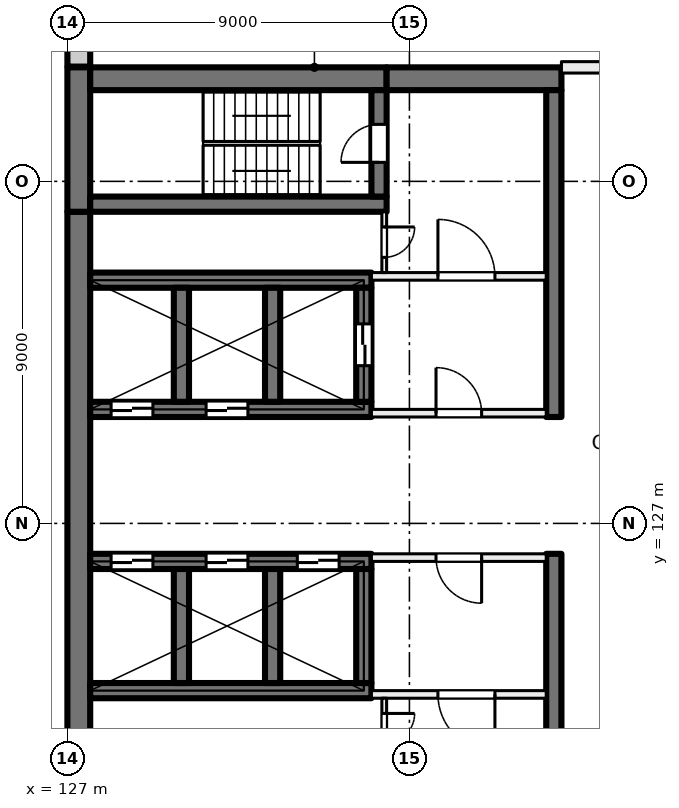
"""IFC4 building model, lengths in metres.
Left out: names, types, materials, properties, quantities, classifications, styles, units other than length and angle.
Written with IfcOpenShell. Run it as: python <this file> out.ifc"""

import sys

from ifc_helpers import new_model, si_unit, direction, frame, frame_2d, origin, place, context, subcontext, project, spatial, rectangle, extrude, element, fill, save


model = new_model("IFC4")
c1 = context("Model", 3, precision=1e-05, world=origin(), true_north=direction((0.0, 1.0)))
c2 = subcontext(c1, "Body", "Model", "MODEL_VIEW")
j1 = project(units=[si_unit("LENGTHUNIT", "METRE"), si_unit("PLANEANGLEUNIT", "RADIAN")], contexts=[c1])
p1 = place(None, origin())
s1 = spatial("IfcSite", under=j1, at=p1, CompositionType="ELEMENT")
p2 = place(p1, origin())
s2 = spatial("IfcBuilding", under=s1, at=p2, CompositionType="ELEMENT")
p3 = place(p2, frame((0.0, 0.0, 101.0)))
s3 = spatial("IfcBuildingStorey", under=s2, at=p3, CompositionType="ELEMENT", Elevation=101.0)
p4 = place(p3, frame((127.3, 120.8, 0.0), z_axis=(0.0, 0.0, 1.0), x_axis=(0.0, 1.0, 0.0)))
e1 = element("IfcWall", 1, at=p4, inside=s3, PredefinedType="SHEAR", context=c2, shape_type="SweptSolid", body=[
    extrude(rectangle(XDim=14.4, YDim=0.6, at=frame_2d((7.2, 0.0))), origin(), (0.0, 0.0, 1.0), 4.0),
])
p5 = place(p3, frame((127.3, 135.2, 0.0), z_axis=(0.0, 0.0, 1.0), x_axis=(0.0, 1.0, 0.0)))
e2 = element("IfcWall", 2, at=p5, inside=s3, PredefinedType="SHEAR", context=c2, shape_type="SweptSolid", body=[
    extrude(rectangle(XDim=3.8, YDim=0.6, at=frame_2d((1.9, 0.0))), origin(), (0.0, 0.0, 1.0), 4.0),
])
p6 = place(p3, frame((127.6, 138.7, 0.0), z_axis=(0.0, 0.0, 1.0), x_axis=(1.0, 0.0, 0.0)))
e3 = element("IfcWall", 3, at=p6, inside=s3, PredefinedType="SHEAR", context=c2, shape_type="SweptSolid", body=[
    extrude(rectangle(XDim=7.8, YDim=0.6, at=frame_2d((3.9, 0.0))), origin(), (0.0, 0.0, 1.0), 4.0),
])
p7 = place(p3, frame((135.4, 138.7, 0.0), z_axis=(0.0, 0.0, 1.0), x_axis=(1.0, 0.0, 0.0)))
e4 = element("IfcWall", 4, at=p7, inside=s3, PredefinedType="SHEAR", context=c2, shape_type="SweptSolid", body=[
    extrude(rectangle(XDim=4.6, YDim=0.6, at=frame_2d((2.3, 0.0))), origin(), (0.0, 0.0, 1.0), 4.0),
])
p8 = place(p3, frame((127.6, 135.4, 0.0), z_axis=(0.0, 0.0, 1.0), x_axis=(1.0, 0.0, 0.0)))
e5 = element("IfcWall", 5, at=p8, inside=s3, PredefinedType="SHEAR", context=c2, shape_type="SweptSolid", body=[
    extrude(rectangle(XDim=7.8, YDim=0.4, at=frame_2d((3.9, 0.0))), origin(), (0.0, 0.0, 1.0), 4.0),
])
p9 = place(p3, frame((135.2, 135.6, 0.0), z_axis=(0.0, 0.0, 1.0), x_axis=(0.0, 1.0, 0.0)))
e6 = element("IfcWall", 6, at=p9, inside=s3, PredefinedType="SHEAR", context=c2, shape_type="SweptSolid", body=[
    extrude(rectangle(XDim=2.8, YDim=0.4, at=frame_2d((1.4, 0.0))), origin(), (0.0, 0.0, 1.0), 4.0),
])
p10 = place(p9, frame((0.9, 0.0, 0.0)))
e7 = element("IfcOpeningElement", 7, at=p10, cuts=e6, PredefinedType="OPENING", context=c2, shape_type="SweptSolid", body=[
    extrude(rectangle(XDim=1.0, YDim=2.1, at=frame_2d((0.5, 1.05))), frame((0.0, 0.21, 0.0), z_axis=(0.0, -1.0, 0.0), x_axis=(1.0, 0.0, 0.0)), (0.0, 0.0, 1.0), 0.42),
])
p11 = place(p3, frame((127.6, 126.0, 0.0), z_axis=(0.0, 0.0, 1.0), x_axis=(1.0, 0.0, 0.0)))
e8 = element("IfcWall", 8, at=p11, inside=s3, PredefinedType="SHEAR", context=c2, shape_type="SweptSolid", body=[
    extrude(rectangle(XDim=7.4, YDim=0.4, at=frame_2d((3.7, 0.0))), origin(), (0.0, 0.0, 1.0), 4.0),
])
p12 = place(p11, frame((0.55, 0.0, 0.0)))
e9 = element("IfcOpeningElement", 9, at=p12, cuts=e8, PredefinedType="OPENING", context=c2, shape_type="SweptSolid", body=[
    extrude(rectangle(XDim=1.1, YDim=2.1, at=frame_2d((0.55, 1.05))), frame((0.0, 0.21, 0.0), z_axis=(0.0, -1.0, 0.0), x_axis=(1.0, 0.0, 0.0)), (0.0, 0.0, 1.0), 0.42),
])
p13 = place(p11, frame((3.05, 0.0, 0.0)))
e10 = element("IfcOpeningElement", 10, at=p13, cuts=e8, PredefinedType="OPENING", context=c2, shape_type="SweptSolid", body=[
    extrude(rectangle(XDim=1.1, YDim=2.1, at=frame_2d((0.55, 1.05))), frame((0.0, 0.21, 0.0), z_axis=(0.0, -1.0, 0.0), x_axis=(1.0, 0.0, 0.0)), (0.0, 0.0, 1.0), 0.42),
])
p14 = place(p11, frame((5.45, 0.0, 0.0)))
e11 = element("IfcOpeningElement", 11, at=p14, cuts=e8, PredefinedType="OPENING", context=c2, shape_type="SweptSolid", body=[
    extrude(rectangle(XDim=1.1, YDim=2.1, at=frame_2d((0.55, 1.05))), frame((0.0, 0.21, 0.0), z_axis=(0.0, -1.0, 0.0), x_axis=(1.0, 0.0, 0.0)), (0.0, 0.0, 1.0), 0.42),
])
p15 = place(p3, frame((127.6, 122.6, 0.0), z_axis=(0.0, 0.0, 1.0), x_axis=(1.0, 0.0, 0.0)))
e12 = element("IfcWall", 12, at=p15, inside=s3, PredefinedType="SHEAR", context=c2, shape_type="SweptSolid", body=[
    extrude(rectangle(XDim=7.4, YDim=0.4, at=frame_2d((3.7, 0.0))), origin(), (0.0, 0.0, 1.0), 4.0),
])
for number, where, z_axis, x_axis in (
    (13, (130.0, 122.8, 0.0), (0.0, 0.0, 1.0), (0.0, 1.0, 0.0)),
    (14, (132.4, 122.8, 0.0), (0.0, 0.0, 1.0), (0.0, 1.0, 0.0)),
    (15, (134.8, 122.8, 0.0), (0.0, 0.0, 1.0), (0.0, 1.0, 0.0)),
):
    element("IfcWall", number, at=place(p3, frame(where, z_axis=z_axis, x_axis=x_axis)), inside=s3, PredefinedType="SHEAR", context=c2, shape_type="SweptSolid", body=[
        extrude(rectangle(XDim=3.0, YDim=0.4, at=frame_2d((1.5, 0.0))), origin(), (0.0, 0.0, 1.0), 4.0),
    ])
p16 = place(p3, frame((127.6, 130.0, 0.0), z_axis=(0.0, 0.0, 1.0), x_axis=(1.0, 0.0, 0.0)))
e16 = element("IfcWall", 16, at=p16, inside=s3, PredefinedType="SHEAR", context=c2, shape_type="SweptSolid", body=[
    extrude(rectangle(XDim=7.4, YDim=0.4, at=frame_2d((3.7, 0.0))), origin(), (0.0, 0.0, 1.0), 4.0),
])
p17 = place(p16, frame((0.55, 0.0, 0.0)))
e17 = element("IfcOpeningElement", 17, at=p17, cuts=e16, PredefinedType="OPENING", context=c2, shape_type="SweptSolid", body=[
    extrude(rectangle(XDim=1.1, YDim=2.1, at=frame_2d((0.55, 1.05))), frame((0.0, 0.21, 0.0), z_axis=(0.0, -1.0, 0.0), x_axis=(1.0, 0.0, 0.0)), (0.0, 0.0, 1.0), 0.42),
])
p18 = place(p16, frame((3.05, 0.0, 0.0)))
e18 = element("IfcOpeningElement", 18, at=p18, cuts=e16, PredefinedType="OPENING", context=c2, shape_type="SweptSolid", body=[
    extrude(rectangle(XDim=1.1, YDim=2.1, at=frame_2d((0.55, 1.05))), frame((0.0, 0.21, 0.0), z_axis=(0.0, -1.0, 0.0), x_axis=(1.0, 0.0, 0.0)), (0.0, 0.0, 1.0), 0.42),
])
p19 = place(p3, frame((127.6, 133.4, 0.0), z_axis=(0.0, 0.0, 1.0), x_axis=(1.0, 0.0, 0.0)))
e19 = element("IfcWall", 19, at=p19, inside=s3, PredefinedType="SHEAR", context=c2, shape_type="SweptSolid", body=[
    extrude(rectangle(XDim=7.4, YDim=0.4, at=frame_2d((3.7, 0.0))), origin(), (0.0, 0.0, 1.0), 4.0),
])
for number, where, z_axis, x_axis in (
    (20, (130.0, 130.2, 0.0), (0.0, 0.0, 1.0), (0.0, 1.0, 0.0)),
    (21, (132.4, 130.2, 0.0), (0.0, 0.0, 1.0), (0.0, 1.0, 0.0)),
):
    element("IfcWall", number, at=place(p3, frame(where, z_axis=z_axis, x_axis=x_axis)), inside=s3, PredefinedType="SHEAR", context=c2, shape_type="SweptSolid", body=[
        extrude(rectangle(XDim=3.0, YDim=0.4, at=frame_2d((1.5, 0.0))), origin(), (0.0, 0.0, 1.0), 4.0),
    ])
p20 = place(p3, frame((134.8, 130.2, 0.0), z_axis=(0.0, 0.0, 1.0), x_axis=(0.0, 1.0, 0.0)))
e22 = element("IfcWall", 22, at=p20, inside=s3, PredefinedType="SHEAR", context=c2, shape_type="SweptSolid", body=[
    extrude(rectangle(XDim=3.0, YDim=0.4, at=frame_2d((1.5, 0.0))), origin(), (0.0, 0.0, 1.0), 4.0),
])
p21 = place(p20, frame((0.95, 0.0, 0.0)))
e23 = element("IfcOpeningElement", 23, at=p21, cuts=e22, PredefinedType="OPENING", context=c2, shape_type="SweptSolid", body=[
    extrude(rectangle(XDim=1.1, YDim=2.1, at=frame_2d((0.55, 1.05))), frame((0.0, 0.21, 0.0), z_axis=(0.0, -1.0, 0.0), x_axis=(1.0, 0.0, 0.0)), (0.0, 0.0, 1.0), 0.42),
])
for number, where, z_axis, x_axis in (
    (24, (139.8, 117.6, 0.0), (0.0, 0.0, 1.0), (0.0, 1.0, 0.0)),
    (25, (139.8, 129.8, 0.0), (0.0, 0.0, 1.0), (0.0, 1.0, 0.0)),
):
    element("IfcWall", number, at=place(p3, frame(where, z_axis=z_axis, x_axis=x_axis)), inside=s3, PredefinedType="SHEAR", context=c2, shape_type="SweptSolid", body=[
        extrude(rectangle(XDim=8.6, YDim=0.4, at=frame_2d((4.3, 0.0))), origin(), (0.0, 0.0, 1.0), 4.0),
    ])
p22 = place(p3, frame((127.3, 139.02, 0.0), z_axis=(0.0, 0.0, 1.0), x_axis=(0.0, 1.0, 0.0)))
e26 = element("IfcWall", 26, at=p22, inside=s3, PredefinedType="SOLIDWALL", context=c2, shape_type="SweptSolid", body=[
    extrude(rectangle(XDim=2.98, YDim=0.6, at=frame_2d((1.49, 0.0))), origin(), (0.0, 0.0, 1.0), 3.625),
])
p23 = place(p3, frame((135.0, 129.9, 0.0), z_axis=(0.0, 0.0, 1.0), x_axis=(1.0, 0.0, 0.0)))
e27 = element("IfcWall", 27, at=p23, inside=s3, PredefinedType="PARTITIONING", context=c2, shape_type="SweptSolid", body=[
    extrude(rectangle(XDim=4.6, YDim=0.2, at=frame_2d((2.3, 0.0))), origin(), (0.0, 0.0, 1.0), 3.625),
])
p24 = place(p23, frame((1.7, 0.0, 0.0)))
e28 = element("IfcOpeningElement", 28, at=p24, cuts=e27, PredefinedType="OPENING", context=c2, shape_type="SweptSolid", body=[
    extrude(rectangle(XDim=1.2, YDim=2.1, at=frame_2d((0.6, 1.05))), frame((0.0, 0.11, 0.0), z_axis=(0.0, -1.0, 0.0), x_axis=(1.0, 0.0, 0.0)), (0.0, 0.0, 1.0), 0.22),
])
p25 = place(p3, frame((135.0, 133.5, 0.0), z_axis=(0.0, 0.0, 1.0), x_axis=(1.0, 0.0, 0.0)))
e29 = element("IfcWall", 29, at=p25, inside=s3, PredefinedType="PARTITIONING", context=c2, shape_type="SweptSolid", body=[
    extrude(rectangle(XDim=4.6, YDim=0.2, at=frame_2d((2.3, 0.0))), origin(), (0.0, 0.0, 1.0), 3.625),
])
p26 = place(p25, frame((1.75, 0.0, 0.0)))
e30 = element("IfcOpeningElement", 30, at=p26, cuts=e29, PredefinedType="OPENING", context=c2, shape_type="SweptSolid", body=[
    extrude(rectangle(XDim=1.5, YDim=2.1, at=frame_2d((0.75, 1.05))), frame((0.0, 0.11, 0.0), z_axis=(0.0, -1.0, 0.0), x_axis=(1.0, 0.0, 0.0)), (0.0, 0.0, 1.0), 0.22),
])
p27 = place(p3, frame((135.337, 135.2, 0.0), z_axis=(0.0, 0.0, 1.0), x_axis=(0.0, -1.0, 0.0)))
e31 = element("IfcWall", 31, at=p27, inside=s3, PredefinedType="PARTITIONING", context=c2, shape_type="SweptSolid", body=[
    extrude(rectangle(XDim=1.6, YDim=0.125, at=frame_2d((0.8, 0.0))), origin(), (0.0, 0.0, 1.0), 3.625),
])
p28 = place(p27, frame((0.4, 0.0, 0.0)))
e32 = element("IfcOpeningElement", 32, at=p28, cuts=e31, PredefinedType="OPENING", context=c2, shape_type="SweptSolid", body=[
    extrude(rectangle(XDim=0.8, YDim=2.1, at=frame_2d((0.4, 1.05))), frame((0.0, 0.073, 0.0), z_axis=(0.0, -1.0, 0.0), x_axis=(1.0, 0.0, 0.0)), (0.0, 0.0, 1.0), 0.145),
])
p29 = place(p3, frame((139.6, 126.1, 0.0), z_axis=(0.0, 0.0, 1.0), x_axis=(-1.0, 0.0, 0.0)))
e33 = element("IfcWall", 33, at=p29, inside=s3, PredefinedType="PARTITIONING", context=c2, shape_type="SweptSolid", body=[
    extrude(rectangle(XDim=4.6, YDim=0.2, at=frame_2d((2.3, 0.0))), origin(), (0.0, 0.0, 1.0), 3.625),
])
p30 = place(p29, frame((1.7, 0.0, 0.0)))
e34 = element("IfcOpeningElement", 34, at=p30, cuts=e33, PredefinedType="OPENING", context=c2, shape_type="SweptSolid", body=[
    extrude(rectangle(XDim=1.2, YDim=2.1, at=frame_2d((0.6, 1.05))), frame((0.0, 0.11, 0.0), z_axis=(0.0, -1.0, 0.0), x_axis=(1.0, 0.0, 0.0)), (0.0, 0.0, 1.0), 0.22),
])
p31 = place(p3, frame((139.6, 122.5, 0.0), z_axis=(0.0, 0.0, 1.0), x_axis=(-1.0, 0.0, 0.0)))
e35 = element("IfcWall", 35, at=p31, inside=s3, PredefinedType="PARTITIONING", context=c2, shape_type="SweptSolid", body=[
    extrude(rectangle(XDim=4.6, YDim=0.2, at=frame_2d((2.3, 0.0))), origin(), (0.0, 0.0, 1.0), 3.625),
])
p32 = place(p31, frame((1.35, 0.0, 0.0)))
e36 = element("IfcOpeningElement", 36, at=p32, cuts=e35, PredefinedType="OPENING", context=c2, shape_type="SweptSolid", body=[
    extrude(rectangle(XDim=1.5, YDim=2.1, at=frame_2d((0.75, 1.05))), frame((0.0, 0.11, 0.0), z_axis=(0.0, -1.0, 0.0), x_axis=(1.0, 0.0, 0.0)), (0.0, 0.0, 1.0), 0.22),
])
p33 = place(p3, frame((135.337, 122.4, 0.0), z_axis=(0.0, 0.0, 1.0), x_axis=(0.0, -1.0, 0.0)))
e37 = element("IfcWall", 37, at=p33, inside=s3, PredefinedType="PARTITIONING", context=c2, shape_type="SweptSolid", body=[
    extrude(rectangle(XDim=1.6, YDim=0.125, at=frame_2d((0.8, 0.0))), origin(), (0.0, 0.0, 1.0), 3.625),
])
p34 = place(p33, frame((0.4, 0.0, 0.0)))
e38 = element("IfcOpeningElement", 38, at=p34, cuts=e37, PredefinedType="OPENING", context=c2, shape_type="SweptSolid", body=[
    extrude(rectangle(XDim=0.8, YDim=2.1, at=frame_2d((0.4, 1.05))), frame((0.0, 0.073, 0.0), z_axis=(0.0, -1.0, 0.0), x_axis=(1.0, 0.0, 0.0)), (0.0, 0.0, 1.0), 0.145),
])
p35 = place(p3, frame((140.0, 139.0, 0.0), z_axis=(0.0, 0.0, 1.0), x_axis=(1.0, 0.0, 0.0)))
e39 = element("IfcWall", 39, at=p35, inside=s3, PredefinedType="PARTITIONING", context=c2, shape_type="SweptSolid", body=[
    extrude(rectangle(XDim=4.35, YDim=0.3, at=frame_2d((2.175, 0.0))), origin(), (0.0, 0.0, 1.0), 3.625),
])
p36 = place(p35, frame((1.283, 0.0, 0.0)))
e40 = element("IfcOpeningElement", 40, at=p36, cuts=e39, PredefinedType="OPENING", context=c2, shape_type="SweptSolid", body=[
    extrude(rectangle(XDim=1.8, YDim=2.1, at=frame_2d((0.9, 1.05))), frame((0.0, 0.16, 0.0), z_axis=(0.0, -1.0, 0.0), x_axis=(1.0, 0.0, 0.0)), (0.0, 0.0, 1.0), 0.32),
])
p37 = place(p17, origin())
e41 = element("IfcDoor", 41, at=p37, inside=s3, OperationType="DOUBLE_DOOR_SLIDING", PredefinedType="DOOR", context=c2, shape_type="SweptSolid", body=[
    extrude(rectangle(XDim=1.1, YDim=2.1, at=frame_2d((0.55, 1.05))), frame((0.0, 0.025, 0.0), z_axis=(0.0, -1.0, 0.0), x_axis=(1.0, 0.0, 0.0)), (0.0, 0.0, 1.0), 0.05),
])
fill(e17, e41)
p38 = place(p18, origin())
e42 = element("IfcDoor", 42, at=p38, inside=s3, OperationType="DOUBLE_DOOR_SLIDING", PredefinedType="DOOR", context=c2, shape_type="SweptSolid", body=[
    extrude(rectangle(XDim=1.1, YDim=2.1, at=frame_2d((0.55, 1.05))), frame((0.0, 0.025, 0.0), z_axis=(0.0, -1.0, 0.0), x_axis=(1.0, 0.0, 0.0)), (0.0, 0.0, 1.0), 0.05),
])
fill(e18, e42)
p39 = place(p12, origin())
e43 = element("IfcDoor", 43, at=p39, inside=s3, OperationType="DOUBLE_DOOR_SLIDING", PredefinedType="DOOR", context=c2, shape_type="SweptSolid", body=[
    extrude(rectangle(XDim=1.1, YDim=2.1, at=frame_2d((0.55, 1.05))), frame((0.0, 0.025, 0.0), z_axis=(0.0, -1.0, 0.0), x_axis=(1.0, 0.0, 0.0)), (0.0, 0.0, 1.0), 0.05),
])
fill(e9, e43)
p40 = place(p13, origin())
e44 = element("IfcDoor", 44, at=p40, inside=s3, OperationType="DOUBLE_DOOR_SLIDING", PredefinedType="DOOR", context=c2, shape_type="SweptSolid", body=[
    extrude(rectangle(XDim=1.1, YDim=2.1, at=frame_2d((0.55, 1.05))), frame((0.0, 0.025, 0.0), z_axis=(0.0, -1.0, 0.0), x_axis=(1.0, 0.0, 0.0)), (0.0, 0.0, 1.0), 0.05),
])
fill(e10, e44)
p41 = place(p14, origin())
e45 = element("IfcDoor", 45, at=p41, inside=s3, OperationType="DOUBLE_DOOR_SLIDING", PredefinedType="DOOR", context=c2, shape_type="SweptSolid", body=[
    extrude(rectangle(XDim=1.1, YDim=2.1, at=frame_2d((0.55, 1.05))), frame((0.0, 0.025, 0.0), z_axis=(0.0, -1.0, 0.0), x_axis=(1.0, 0.0, 0.0)), (0.0, 0.0, 1.0), 0.05),
])
fill(e11, e45)
p42 = place(p24, origin())
e46 = element("IfcDoor", 46, at=p42, inside=s3, OperationType="DOUBLE_DOOR_SINGLE_SWING", PredefinedType="DOOR", context=c2, shape_type="SweptSolid", body=[
    extrude(rectangle(XDim=1.2, YDim=2.1, at=frame_2d((0.6, 1.05))), frame((0.0, 0.025, 0.0), z_axis=(0.0, -1.0, 0.0), x_axis=(1.0, 0.0, 0.0)), (0.0, 0.0, 1.0), 0.05),
])
fill(e28, e46)
p43 = place(p26, origin())
e47 = element("IfcDoor", 47, at=p43, inside=s3, OperationType="DOUBLE_DOOR_SINGLE_SWING", PredefinedType="DOOR", context=c2, shape_type="SweptSolid", body=[
    extrude(rectangle(XDim=1.5, YDim=2.1, at=frame_2d((0.75, 1.05))), frame((0.0, 0.025, 0.0), z_axis=(0.0, -1.0, 0.0), x_axis=(1.0, 0.0, 0.0)), (0.0, 0.0, 1.0), 0.05),
])
fill(e30, e47)
p44 = place(p10, origin())
e48 = element("IfcDoor", 48, at=p44, inside=s3, OperationType="SINGLE_SWING_LEFT", PredefinedType="DOOR", context=c2, shape_type="SweptSolid", body=[
    extrude(rectangle(XDim=1.0, YDim=2.1, at=frame_2d((0.5, 1.05))), frame((0.0, 0.025, 0.0), z_axis=(0.0, -1.0, 0.0), x_axis=(1.0, 0.0, 0.0)), (0.0, 0.0, 1.0), 0.05),
])
fill(e7, e48)
p45 = place(p28, origin())
e49 = element("IfcDoor", 49, at=p45, inside=s3, OperationType="SINGLE_SWING_RIGHT", PredefinedType="DOOR", context=c2, shape_type="SweptSolid", body=[
    extrude(rectangle(XDim=0.8, YDim=2.1, at=frame_2d((0.4, 1.05))), frame((0.0, 0.025, 0.0), z_axis=(0.0, -1.0, 0.0), x_axis=(1.0, 0.0, 0.0)), (0.0, 0.0, 1.0), 0.05),
])
fill(e32, e49)
p46 = place(p30, origin())
e50 = element("IfcDoor", 50, at=p46, inside=s3, OperationType="DOUBLE_DOOR_SINGLE_SWING", PredefinedType="DOOR", context=c2, shape_type="SweptSolid", body=[
    extrude(rectangle(XDim=1.2, YDim=2.1, at=frame_2d((0.6, 1.05))), frame((0.0, 0.025, 0.0), z_axis=(0.0, -1.0, 0.0), x_axis=(1.0, 0.0, 0.0)), (0.0, 0.0, 1.0), 0.05),
])
fill(e34, e50)
p47 = place(p32, origin())
e51 = element("IfcDoor", 51, at=p47, inside=s3, OperationType="DOUBLE_DOOR_SINGLE_SWING", PredefinedType="DOOR", context=c2, shape_type="SweptSolid", body=[
    extrude(rectangle(XDim=1.5, YDim=2.1, at=frame_2d((0.75, 1.05))), frame((0.0, 0.025, 0.0), z_axis=(0.0, -1.0, 0.0), x_axis=(1.0, 0.0, 0.0)), (0.0, 0.0, 1.0), 0.05),
])
fill(e36, e51)
p48 = place(p34, origin())
e52 = element("IfcDoor", 52, at=p48, inside=s3, OperationType="SINGLE_SWING_LEFT", PredefinedType="DOOR", context=c2, shape_type="SweptSolid", body=[
    extrude(rectangle(XDim=0.8, YDim=2.1, at=frame_2d((0.4, 1.05))), frame((0.0, 0.025, 0.0), z_axis=(0.0, -1.0, 0.0), x_axis=(1.0, 0.0, 0.0)), (0.0, 0.0, 1.0), 0.05),
])
fill(e38, e52)
p49 = place(p21, origin())
e53 = element("IfcDoor", 53, at=p49, inside=s3, OperationType="DOUBLE_DOOR_SLIDING", PredefinedType="DOOR", context=c2, shape_type="SweptSolid", body=[
    extrude(rectangle(XDim=1.1, YDim=2.1, at=frame_2d((0.55, 1.05))), frame((0.0, 0.025, 0.0), z_axis=(0.0, -1.0, 0.0), x_axis=(1.0, 0.0, 0.0)), (0.0, 0.0, 1.0), 0.05),
])
fill(e23, e53)
save(model, sys.argv[1])
